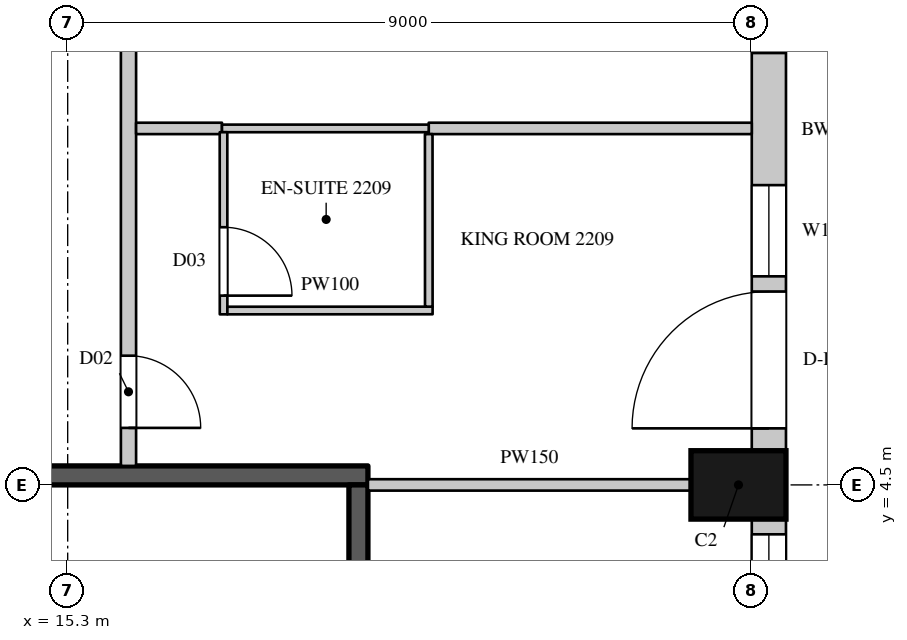
"""IFC4 building model, lengths in metres.
Left out: names, types, materials, properties, quantities, classifications, styles, units other than length and angle.
Written with IfcOpenShell. Run it as: python <this file> out.ifc"""

import sys

from ifc_helpers import new_model, si_unit, direction, frame, frame_2d, origin, origin_2d, place, context, subcontext, project, spatial, rectangle, extrude, element, fill, save


model = new_model("IFC4")
c1 = context("Model", 3, precision=1e-05, world=origin(), true_north=direction((0.0, 1.0)))
c2 = subcontext(c1, "Body", "Model", "MODEL_VIEW")
j1 = project(units=[si_unit("LENGTHUNIT", "METRE"), si_unit("PLANEANGLEUNIT", "RADIAN")], contexts=[c1])
p1 = place(None, origin())
s1 = spatial("IfcSite", under=j1, at=p1, CompositionType="ELEMENT")
p2 = place(p1, origin())
s2 = spatial("IfcBuilding", under=s1, at=p2, CompositionType="ELEMENT")
p3 = place(p2, frame((0.0, 0.0, 109.5)))
s3 = spatial("IfcBuildingStorey", under=s2, at=p3, CompositionType="ELEMENT", Elevation=109.5)
p4 = place(p3, frame((24.125, 4.5, 0.0), z_axis=(0.0, 0.0, 1.0), x_axis=(0.0, 1.0, 0.0)))
e1 = element("IfcColumn", 1, at=p4, inside=s3, PredefinedType="COLUMN", context=c2, shape_type="SweptSolid", body=[
    extrude(rectangle(XDim=0.9, YDim=1.25, at=origin_2d()), origin(), (0.0, 0.0, 1.0), 3.6),
])
p5 = place(p3, frame((24.525, -4.05, 0.0), z_axis=(0.0, 0.0, 1.0), x_axis=(0.0, 1.0, 0.0)))
e2 = element("IfcWall", 2, at=p5, inside=s3, PredefinedType="SOLIDWALL", context=c2, shape_type="SweptSolid", body=[
    extrude(rectangle(XDim=8.1, YDim=0.45, at=frame_2d((4.05, 0.0))), origin(), (0.0, 0.0, 1.0), 3.3),
])
p6 = place(p5, frame((0.2, 0.0, 0.0)))
e3 = element("IfcOpeningElement", 3, at=p6, cuts=e2, PredefinedType="OPENING", context=c2, shape_type="SweptSolid", body=[
    extrude(rectangle(XDim=1.8, YDim=2.4, at=frame_2d((0.9, 1.2))), frame((0.0, 0.235, 0.0), z_axis=(0.0, -1.0, 0.0), x_axis=(1.0, 0.0, 0.0)), (0.0, 0.0, 1.0), 0.47),
])
p7 = place(p5, frame((2.2, 0.0, 1.05)))
e4 = element("IfcOpeningElement", 4, at=p7, cuts=e2, PredefinedType="OPENING", context=c2, shape_type="SweptSolid", body=[
    extrude(rectangle(XDim=1.2, YDim=2.0, at=frame_2d((0.6, 1.0))), frame((0.0, 0.235, 0.0), z_axis=(0.0, -1.0, 0.0), x_axis=(1.0, 0.0, 0.0)), (0.0, 0.0, 1.0), 0.47),
])
p8 = place(p5, frame((4.7, 0.0, 0.0)))
e5 = element("IfcOpeningElement", 5, at=p8, cuts=e2, PredefinedType="OPENING", context=c2, shape_type="SweptSolid", body=[
    extrude(rectangle(XDim=1.8, YDim=2.4, at=frame_2d((0.9, 1.2))), frame((0.0, 0.235, 0.0), z_axis=(0.0, -1.0, 0.0), x_axis=(1.0, 0.0, 0.0)), (0.0, 0.0, 1.0), 0.47),
])
p9 = place(p5, frame((6.7, 0.0, 1.05)))
e6 = element("IfcOpeningElement", 6, at=p9, cuts=e2, PredefinedType="OPENING", context=c2, shape_type="SweptSolid", body=[
    extrude(rectangle(XDim=1.2, YDim=2.0, at=frame_2d((0.6, 1.0))), frame((0.0, 0.235, 0.0), z_axis=(0.0, -1.0, 0.0), x_axis=(1.0, 0.0, 0.0)), (0.0, 0.0, 1.0), 0.47),
])
p10 = place(p3, frame((24.525, 4.95, 0.0), z_axis=(0.0, 0.0, 1.0), x_axis=(0.0, 1.0, 0.0)))
e7 = element("IfcWall", 7, at=p10, inside=s3, PredefinedType="SOLIDWALL", context=c2, shape_type="SweptSolid", body=[
    extrude(rectangle(XDim=8.439, YDim=0.45, at=frame_2d((4.219, 0.0))), origin(), (0.0, 0.0, 1.0), 3.3),
])
p11 = place(p10, frame((0.294, 0.0, 0.0)))
e8 = element("IfcOpeningElement", 8, at=p11, cuts=e7, PredefinedType="OPENING", context=c2, shape_type="SweptSolid", body=[
    extrude(rectangle(XDim=1.8, YDim=2.4, at=frame_2d((0.9, 1.2))), frame((0.0, 0.235, 0.0), z_axis=(0.0, -1.0, 0.0), x_axis=(1.0, 0.0, 0.0)), (0.0, 0.0, 1.0), 0.47),
])
p12 = place(p10, frame((2.294, 0.0, 1.05)))
e9 = element("IfcOpeningElement", 9, at=p12, cuts=e7, PredefinedType="OPENING", context=c2, shape_type="SweptSolid", body=[
    extrude(rectangle(XDim=1.2, YDim=2.0, at=frame_2d((0.6, 1.0))), frame((0.0, 0.235, 0.0), z_axis=(0.0, -1.0, 0.0), x_axis=(1.0, 0.0, 0.0)), (0.0, 0.0, 1.0), 0.47),
])
p13 = place(p10, frame((5.232, 0.0, 1.05)))
e10 = element("IfcOpeningElement", 10, at=p13, cuts=e7, PredefinedType="OPENING", context=c2, shape_type="SweptSolid", body=[
    extrude(rectangle(XDim=2.7, YDim=2.0, at=frame_2d((1.35, 1.0))), frame((0.0, 0.235, 0.0), z_axis=(0.0, -1.0, 0.0), x_axis=(1.0, 0.0, 0.0)), (0.0, 0.0, 1.0), 0.47),
])
p14 = place(p3, frame((16.1, 4.75, 0.0), z_axis=(0.0, 0.0, 1.0), x_axis=(0.0, 1.0, 0.0)))
e11 = element("IfcWall", 11, at=p14, inside=s3, PredefinedType="PARTITIONING", context=c2, shape_type="SweptSolid", body=[
    extrude(rectangle(XDim=12.65, YDim=0.2, at=frame_2d((6.325, 0.0))), origin(), (0.0, 0.0, 1.0), 3.3),
])
p15 = place(p14, frame((0.5, 0.0, 0.0)))
e12 = element("IfcOpeningElement", 12, at=p15, cuts=e11, PredefinedType="OPENING", context=c2, shape_type="SweptSolid", body=[
    extrude(rectangle(XDim=0.95, YDim=2.2, at=frame_2d((0.475, 1.1))), frame((0.0, 0.11, 0.0), z_axis=(0.0, -1.0, 0.0), x_axis=(1.0, 0.0, 0.0)), (0.0, 0.0, 1.0), 0.22),
])
p16 = place(p14, frame((6.9, 0.0, 0.0)))
e13 = element("IfcOpeningElement", 13, at=p16, cuts=e11, PredefinedType="OPENING", context=c2, shape_type="SweptSolid", body=[
    extrude(rectangle(XDim=0.95, YDim=2.2, at=frame_2d((0.475, 1.1))), frame((0.0, 0.11, 0.0), z_axis=(0.0, -1.0, 0.0), x_axis=(1.0, 0.0, 0.0)), (0.0, 0.0, 1.0), 0.22),
])
p17 = place(p3, frame((16.2, 9.19, 0.0), z_axis=(0.0, 0.0, 1.0), x_axis=(1.0, 0.0, 0.0)))
e14 = element("IfcWall", 14, at=p17, inside=s3, PredefinedType="PARTITIONING", context=c2, shape_type="SweptSolid", body=[
    extrude(rectangle(XDim=1.13, YDim=0.15, at=frame_2d((0.565, 0.0))), origin(), (0.0, 0.0, 1.0), 2.65),
])
p18 = place(p3, frame((19.25, 4.5, 0.0), z_axis=(0.0, 0.0, 1.0), x_axis=(1.0, 0.0, 0.0)))
e15 = element("IfcWall", 15, at=p18, inside=s3, PredefinedType="PARTITIONING", context=c2, shape_type="SweptSolid", body=[
    extrude(rectangle(XDim=4.25, YDim=0.15, at=frame_2d((2.125, 0.0))), origin(), (0.0, 0.0, 1.0), 3.3),
])
p19 = place(p3, frame((20.05, 9.19, 0.0), z_axis=(0.0, 0.0, 1.0), x_axis=(1.0, 0.0, 0.0)))
e16 = element("IfcWall", 16, at=p19, inside=s3, PredefinedType="PARTITIONING", context=c2, shape_type="SweptSolid", body=[
    extrude(rectangle(XDim=4.25, YDim=0.15, at=frame_2d((2.125, 0.0))), origin(), (0.0, 0.0, 1.0), 2.65),
])
p20 = place(p3, frame((14.55, 4.625, 0.0), z_axis=(0.0, 0.0, 1.0), x_axis=(1.0, 0.0, 0.0)))
e17 = element("IfcWall", 17, at=p20, inside=s3, PredefinedType="SHEAR", context=c2, shape_type="SweptSolid", body=[
    extrude(rectangle(XDim=4.7, YDim=0.25, at=frame_2d((2.35, 0.0))), origin(), (0.0, 0.0, 1.0), 3.3),
])
p21 = place(p3, frame((19.125, -4.5, 0.0), z_axis=(0.0, 0.0, 1.0), x_axis=(0.0, 1.0, 0.0)))
e18 = element("IfcWall", 18, at=p21, inside=s3, PredefinedType="SHEAR", context=c2, shape_type="SweptSolid", body=[
    extrude(rectangle(XDim=9.0, YDim=0.25, at=frame_2d((4.5, 0.0))), origin(), (0.0, 0.0, 1.0), 3.3),
])
p22 = place(p3, frame((17.33, 9.19, 0.0), z_axis=(0.0, 0.0, 1.0), x_axis=(1.0, 0.0, 0.0)))
e19 = element("IfcWall", 19, at=p22, inside=s3, PredefinedType="PARTITIONING", context=c2, shape_type="SweptSolid", body=[
    extrude(rectangle(XDim=2.72, YDim=0.1, at=frame_2d((1.36, 0.0))), origin(), (0.0, 0.0, 1.0), 2.65),
])
p23 = place(p3, frame((17.35, 9.14, 0.0), z_axis=(0.0, 0.0, 1.0), x_axis=(0.000407580973, -0.999999916939, 0.0)))
e20 = element("IfcWall", 20, at=p23, inside=s3, PredefinedType="PARTITIONING", context=c2, shape_type="SweptSolid", body=[
    extrude(rectangle(XDim=2.396, YDim=0.1, at=frame_2d((1.198, 0.0))), origin(), (0.0, 0.0, 1.0), 3.3),
])
p24 = place(p23, frame((1.25, 0.0, 0.0)))
e21 = element("IfcOpeningElement", 21, at=p24, cuts=e20, PredefinedType="OPENING", context=c2, shape_type="SweptSolid", body=[
    extrude(rectangle(XDim=0.9, YDim=2.2, at=frame_2d((0.45, 1.1))), frame((0.0, 0.06, 0.0), z_axis=(0.0, -1.0, 0.0), x_axis=(1.0, 0.0, 0.0)), (0.0, 0.0, 1.0), 0.12),
])
p25 = place(p3, frame((17.401, 6.794, 0.0), z_axis=(0.0, 0.0, 1.0), x_axis=(0.9999999346, 0.000361663629, 0.0)))
e22 = element("IfcWall", 22, at=p25, inside=s3, PredefinedType="PARTITIONING", context=c2, shape_type="SweptSolid", body=[
    extrude(rectangle(XDim=2.7, YDim=0.1, at=frame_2d((1.35, 0.0))), origin(), (0.0, 0.0, 1.0), 3.3),
])
p26 = place(p3, frame((20.05, 9.115, 0.0), z_axis=(0.0, 0.0, 1.0), x_axis=(0.000430200003, -0.999999907464, 0.0)))
e23 = element("IfcWall", 23, at=p26, inside=s3, PredefinedType="PARTITIONING", context=c2, shape_type="SweptSolid", body=[
    extrude(rectangle(XDim=2.27, YDim=0.1, at=frame_2d((1.135, 0.0))), origin(), (0.0, 0.0, 1.0), 3.3),
])
p27 = place(p9, origin())
e24 = element("IfcWindow", 24, at=p27, inside=s3, PartitioningType="SINGLE_PANEL", PredefinedType="WINDOW", context=c2, shape_type="SweptSolid", body=[
    extrude(rectangle(XDim=1.2, YDim=2.0, at=frame_2d((0.6, 1.0))), frame((0.0, 0.135, 0.0), z_axis=(0.0, -1.0, 0.0), x_axis=(1.0, 0.0, 0.0)), (0.0, 0.0, 1.0), 0.06),
])
fill(e6, e24)
p28 = place(p11, origin())
e25 = element("IfcDoor", 25, at=p28, inside=s3, OperationType="SLIDING_TO_LEFT", PredefinedType="DOOR", context=c2, shape_type="SweptSolid", body=[
    extrude(rectangle(XDim=1.8, YDim=2.4, at=frame_2d((0.9, 1.2))), frame((0.0, 0.13, 0.0), z_axis=(0.0, -1.0, 0.0), x_axis=(1.0, 0.0, 0.0)), (0.0, 0.0, 1.0), 0.05),
])
fill(e8, e25)
p29 = place(p12, origin())
e26 = element("IfcWindow", 26, at=p29, inside=s3, PartitioningType="SINGLE_PANEL", PredefinedType="WINDOW", context=c2, shape_type="SweptSolid", body=[
    extrude(rectangle(XDim=1.2, YDim=2.0, at=frame_2d((0.6, 1.0))), frame((0.0, 0.135, 0.0), z_axis=(0.0, -1.0, 0.0), x_axis=(1.0, 0.0, 0.0)), (0.0, 0.0, 1.0), 0.06),
])
fill(e9, e26)
p30 = place(p13, origin())
e27 = element("IfcWindow", 27, at=p30, inside=s3, PartitioningType="SINGLE_PANEL", PredefinedType="WINDOW", context=c2, shape_type="SweptSolid", body=[
    extrude(rectangle(XDim=2.7, YDim=2.0, at=frame_2d((1.35, 1.0))), frame((0.0, 0.135, 0.0), z_axis=(0.0, -1.0, 0.0), x_axis=(1.0, 0.0, 0.0)), (0.0, 0.0, 1.0), 0.06),
])
fill(e10, e27)
p31 = place(p15, origin())
e28 = element("IfcDoor", 28, at=p31, inside=s3, OperationType="SINGLE_SWING_RIGHT", PredefinedType="DOOR", context=c2, shape_type="SweptSolid", body=[
    extrude(rectangle(XDim=0.95, YDim=2.2, at=frame_2d((0.475, 1.1))), frame((0.0, 0.025, 0.0), z_axis=(0.0, -1.0, 0.0), x_axis=(1.0, 0.0, 0.0)), (0.0, 0.0, 1.0), 0.05),
])
fill(e12, e28)
p32 = place(p24, origin())
e29 = element("IfcDoor", 29, at=p32, inside=s3, OperationType="SINGLE_SWING_RIGHT", PredefinedType="DOOR", context=c2, shape_type="SweptSolid", body=[
    extrude(rectangle(XDim=0.9, YDim=2.2, at=frame_2d((0.45, 1.1))), frame((0.0, 0.025, 0.0), z_axis=(0.0, -1.0, 0.0), x_axis=(1.0, 0.0, 0.0)), (0.0, 0.0, 1.0), 0.05),
])
fill(e21, e29)
save(model, sys.argv[1])
